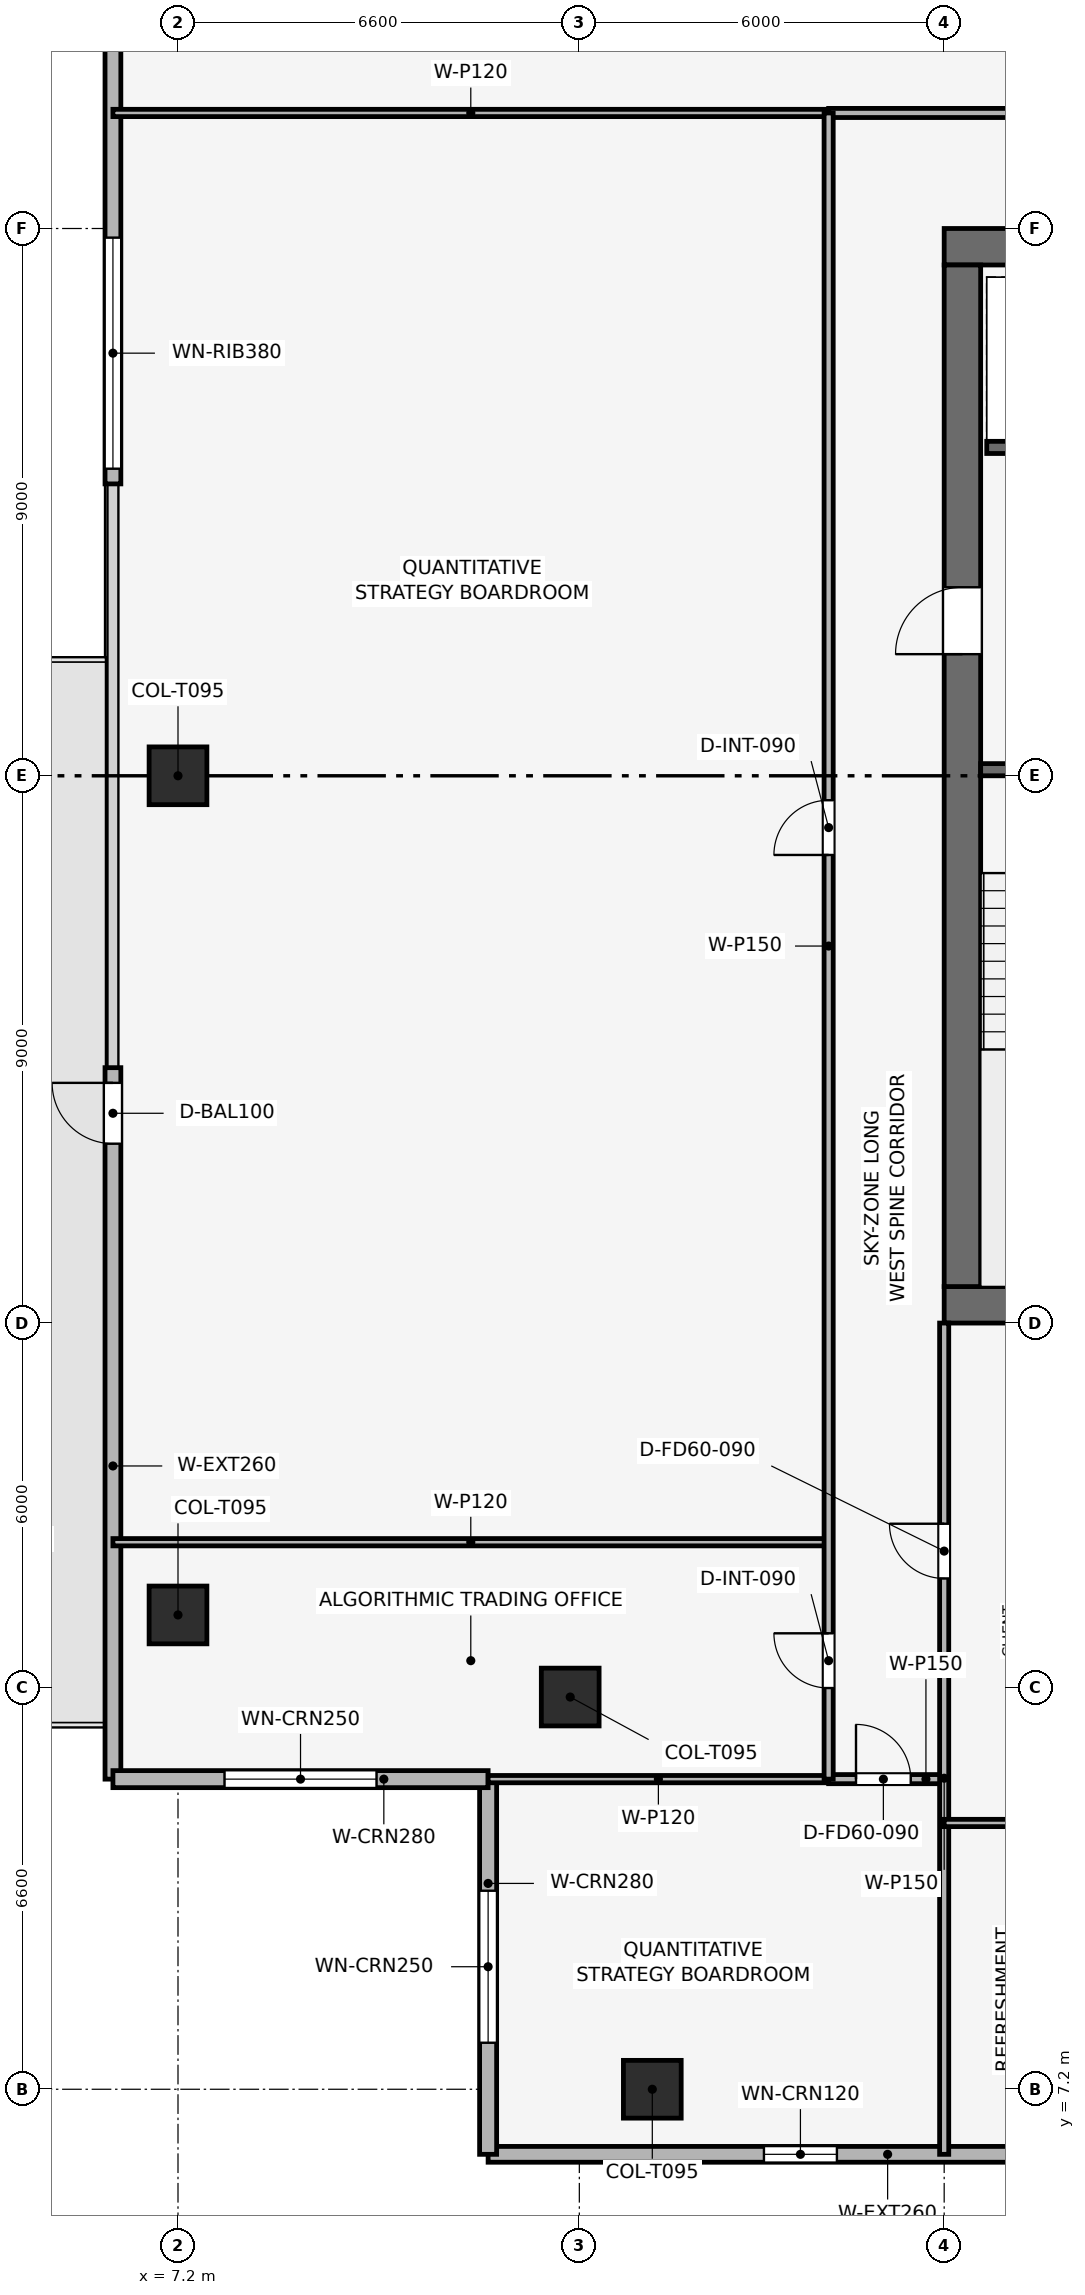
"""IFC4 building model, lengths in metres.
Left out: names, types, materials, properties, quantities, classifications, styles, units other than length and angle.
Written with IfcOpenShell. Run it as: python <this file> out.ifc"""

import sys

from ifc_helpers import new_model, si_unit, direction, frame, frame_2d, origin, origin_2d, place, context, subcontext, project, spatial, rectangle, extrude, element, fill, save


model = new_model("IFC4")
c1 = context("Model", 3, precision=1e-05, world=origin(), true_north=direction((0.0, 1.0)))
c2 = subcontext(c1, "Body", "Model", "MODEL_VIEW")
j1 = project(units=[si_unit("LENGTHUNIT", "METRE"), si_unit("PLANEANGLEUNIT", "RADIAN")], contexts=[c1])
p1 = place(None, origin())
s1 = spatial("IfcSite", under=j1, at=p1, CompositionType="ELEMENT")
p2 = place(p1, origin())
s2 = spatial("IfcBuilding", under=s1, at=p2, CompositionType="ELEMENT")
p3 = place(p2, frame((0.0, 0.0, 310.5)))
s3 = spatial("IfcBuildingStorey", under=s2, at=p3, CompositionType="ELEMENT", Elevation=310.5)
p4 = place(p3, frame((19.8, 20.1, 0.0), z_axis=(0.0, 0.0, 1.0), x_axis=(1.0, 0.0, 0.0)))
e1 = element("IfcWall", 1, at=p4, inside=s3, PredefinedType="SHEAR", context=c2, shape_type="SweptSolid", body=[
    extrude(rectangle(XDim=18.0, YDim=0.6, at=frame_2d((9.0, 0.0))), origin(), (0.0, 0.0, 1.0), 3.75),
])
p5 = place(p3, frame((19.8, 37.5, 0.0), z_axis=(0.0, 0.0, 1.0), x_axis=(1.0, 0.0, 0.0)))
e2 = element("IfcWall", 2, at=p5, inside=s3, PredefinedType="SHEAR", context=c2, shape_type="SweptSolid", body=[
    extrude(rectangle(XDim=18.0, YDim=0.6, at=frame_2d((9.0, 0.0))), origin(), (0.0, 0.0, 1.0), 3.75),
])
p6 = place(p5, frame((7.05, 0.0, 0.0)))
e3 = element("IfcOpeningElement", 3, at=p6, cuts=e2, PredefinedType="OPENING", context=c2, shape_type="SweptSolid", body=[
    extrude(rectangle(XDim=1.1, YDim=2.15, at=frame_2d((0.55, 1.075))), frame((0.0, 0.31, 0.0), z_axis=(0.0, -1.0, 0.0), x_axis=(1.0, 0.0, 0.0)), (0.0, 0.0, 1.0), 0.62),
])
p7 = place(p3, frame((20.1, 20.4, 0.0), z_axis=(0.0, 0.0, 1.0), x_axis=(0.0, 1.0, 0.0)))
e4 = element("IfcWall", 4, at=p7, inside=s3, PredefinedType="SHEAR", context=c2, shape_type="SweptSolid", body=[
    extrude(rectangle(XDim=16.8, YDim=0.6, at=frame_2d((8.4, 0.0))), origin(), (0.0, 0.0, 1.0), 3.75),
])
p8 = place(p7, frame((10.4, 0.0, 0.0)))
e5 = element("IfcOpeningElement", 5, at=p8, cuts=e4, PredefinedType="OPENING", context=c2, shape_type="SweptSolid", body=[
    extrude(rectangle(XDim=1.1, YDim=2.15, at=frame_2d((0.55, 1.075))), frame((0.0, 0.31, 0.0), z_axis=(0.0, -1.0, 0.0), x_axis=(1.0, 0.0, 0.0)), (0.0, 0.0, 1.0), 0.62),
])
for number, where, z_axis, x_axis in (
    (6, (15.0, 7.2, 0.003), (0.0, 0.0, 1.0), (1.0, 0.0, 0.0)),
    (7, (7.2, 28.8, 0.003), (0.0, 0.0, 1.0), (1.0, 0.0, 0.0)),
    (8, (7.2, 15.0, 0.003), (0.0, 0.0, 1.0), (1.0, 0.0, 0.0)),
    (9, (13.65, 13.65, 0.003), (0.0, 0.0, 1.0), (1.0, 0.0, 0.0)),
):
    element("IfcColumn", number, at=place(p3, frame(where, z_axis=z_axis, x_axis=x_axis)), inside=s3, PredefinedType="COLUMN", context=c2, shape_type="SweptSolid", body=[
        extrude(rectangle(XDim=0.95, YDim=0.95, at=origin_2d()), origin(), (0.0, 0.0, 1.0), 3.504),
    ])
p9 = place(p3, frame((24.0, 6.13, 0.0), z_axis=(0.0, 0.0, 1.0), x_axis=(-1.0, 0.0, 0.0)))
e10 = element("IfcWall", 10, at=p9, inside=s3, PredefinedType="SOLIDWALL", context=c2, shape_type="SweptSolid", body=[
    extrude(rectangle(XDim=11.7, YDim=0.26, at=frame_2d((5.85, 0.0))), origin(), (0.0, 0.0, 1.0), 3.51),
])
p10 = place(p9, frame((5.964, 0.0, 0.9)))
e11 = element("IfcOpeningElement", 11, at=p10, cuts=e10, PredefinedType="OPENING", context=c2, shape_type="SweptSolid", body=[
    extrude(rectangle(XDim=1.2, YDim=2.1, at=frame_2d((0.6, 1.05))), frame((0.0, 0.14, 0.0), z_axis=(0.0, -1.0, 0.0), x_axis=(1.0, 0.0, 0.0)), (0.0, 0.0, 1.0), 0.28),
])
p11 = place(p3, frame((6.13, 12.3, 0.0), z_axis=(0.0, 0.0, 1.0), x_axis=(0.0, 1.0, 0.0)))
e12 = element("IfcWall", 12, at=p11, inside=s3, PredefinedType="SOLIDWALL", context=c2, shape_type="SweptSolid", body=[
    extrude(rectangle(XDim=11.7, YDim=0.26, at=frame_2d((5.85, 0.0))), origin(), (0.0, 0.0, 1.0), 3.51),
])
p12 = place(p11, frame((10.45, 0.0, 0.0)))
e13 = element("IfcOpeningElement", 13, at=p12, cuts=e12, PredefinedType="OPENING", context=c2, shape_type="SweptSolid", body=[
    extrude(rectangle(XDim=1.0, YDim=2.2, at=frame_2d((0.5, 1.1))), frame((0.0, 0.14, 0.0), z_axis=(0.0, -1.0, 0.0), x_axis=(1.0, 0.0, 0.0)), (0.0, 0.0, 1.0), 0.28),
])
p13 = place(p3, frame((6.13, 33.6, 0.0), z_axis=(0.0, 0.0, 1.0), x_axis=(0.0, 1.0, 0.0)))
e14 = element("IfcWall", 14, at=p13, inside=s3, PredefinedType="SOLIDWALL", context=c2, shape_type="SweptSolid", body=[
    extrude(rectangle(XDim=11.7, YDim=0.26, at=frame_2d((5.85, 0.0))), origin(), (0.0, 0.0, 1.0), 3.51),
])
p14 = place(p13, frame((0.25, 0.0, 0.9)))
e15 = element("IfcOpeningElement", 15, at=p14, cuts=e14, PredefinedType="OPENING", context=c2, shape_type="SweptSolid", body=[
    extrude(rectangle(XDim=3.8, YDim=1.9, at=frame_2d((1.9, 0.95))), frame((0.0, 0.14, 0.0), z_axis=(0.0, -1.0, 0.0), x_axis=(1.0, 0.0, 0.0)), (0.0, 0.0, 1.0), 0.28),
])
p15 = place(p3, frame((12.3, 6.13, 0.0), z_axis=(0.0, 0.0, 1.0), x_axis=(0.0, 1.0, 0.0)))
e16 = element("IfcWall", 16, at=p15, inside=s3, PredefinedType="SOLIDWALL", context=c2, shape_type="SweptSolid", body=[
    extrude(rectangle(XDim=6.17, YDim=0.28, at=frame_2d((3.085, 0.0))), origin(), (0.0, 0.0, 1.0), 3.51),
])
p16 = place(p15, frame((1.835, 0.0, 0.9)))
e17 = element("IfcOpeningElement", 17, at=p16, cuts=e16, PredefinedType="OPENING", context=c2, shape_type="SweptSolid", body=[
    extrude(rectangle(XDim=2.5, YDim=1.9, at=frame_2d((1.25, 0.95))), frame((0.0, 0.15, 0.0), z_axis=(0.0, -1.0, 0.0), x_axis=(1.0, 0.0, 0.0)), (0.0, 0.0, 1.0), 0.3),
])
p17 = place(p3, frame((12.3, 12.3, 0.0), z_axis=(0.0, 0.0, 1.0), x_axis=(-1.0, 0.0, 0.0)))
e18 = element("IfcWall", 18, at=p17, inside=s3, PredefinedType="SOLIDWALL", context=c2, shape_type="SweptSolid", body=[
    extrude(rectangle(XDim=6.17, YDim=0.28, at=frame_2d((3.085, 0.0))), origin(), (0.0, 0.0, 1.0), 3.51),
])
p18 = place(p17, frame((1.835, 0.0, 0.9)))
e19 = element("IfcOpeningElement", 19, at=p18, cuts=e18, PredefinedType="OPENING", context=c2, shape_type="SweptSolid", body=[
    extrude(rectangle(XDim=2.5, YDim=1.9, at=frame_2d((1.25, 0.95))), frame((0.0, 0.15, 0.0), z_axis=(0.0, -1.0, 0.0), x_axis=(1.0, 0.0, 0.0)), (0.0, 0.0, 1.0), 0.3),
])
p19 = place(p3, frame((20.4, 28.9, 0.0), z_axis=(0.0, 0.0, 1.0), x_axis=(1.0, 0.0, 0.0)))
e20 = element("IfcWall", 20, at=p19, inside=s3, PredefinedType="SHEAR", context=c2, shape_type="SweptSolid", body=[
    extrude(rectangle(XDim=3.15, YDim=0.2, at=frame_2d((1.575, 0.0))), origin(), (0.0, 0.0, 1.0), 3.51),
])
p20 = place(p19, frame((0.8, 0.0, 0.0)))
e21 = element("IfcOpeningElement", 21, at=p20, cuts=e20, PredefinedType="OPENING", context=c2, shape_type="SweptSolid", body=[
    extrude(rectangle(XDim=1.0, YDim=2.1, at=frame_2d((0.5, 1.05))), frame((0.0, 0.11, 0.0), z_axis=(0.0, -1.0, 0.0), x_axis=(1.0, 0.0, 0.0)), (0.0, 0.0, 1.0), 0.22),
])
p21 = place(p3, frame((20.5, 34.2, 0.0), z_axis=(0.0, 0.0, 1.0), x_axis=(1.0, 0.0, 0.0)))
e22 = element("IfcWall", 22, at=p21, inside=s3, PredefinedType="SHEAR", context=c2, shape_type="SweptSolid", body=[
    extrude(rectangle(XDim=3.05, YDim=0.2, at=frame_2d((1.525, 0.0))), origin(), (0.0, 0.0, 1.0), 3.51),
])
p22 = place(p21, frame((0.75, 0.0, 0.0)))
e23 = element("IfcOpeningElement", 23, at=p22, cuts=e22, PredefinedType="OPENING", context=c2, shape_type="SweptSolid", body=[
    extrude(rectangle(XDim=1.1, YDim=2.15, at=frame_2d((0.55, 1.075))), frame((0.0, 0.11, 0.0), z_axis=(0.0, -1.0, 0.0), x_axis=(1.0, 0.0, 0.0)), (0.0, 0.0, 1.0), 0.22),
])
p23 = place(p3, frame((6.13, 16.196, 0.0), z_axis=(0.0, 0.0, 1.0), x_axis=(1.0, 0.0, 0.0)))
e24 = element("IfcWall", 24, at=p23, inside=s3, PredefinedType="PARTITIONING", context=c2, shape_type="SweptSolid", body=[
    extrude(rectangle(XDim=11.77, YDim=0.12, at=frame_2d((5.885, 0.0))), origin(), (0.0, 0.0, 1.0), 3.095),
])
p24 = place(p3, frame((12.3, 12.3, 0.0), z_axis=(0.0, 0.0, 1.0), x_axis=(1.0, 0.0, 0.0)))
e25 = element("IfcWall", 25, at=p24, inside=s3, PredefinedType="PARTITIONING", context=c2, shape_type="SweptSolid", body=[
    extrude(rectangle(XDim=5.6, YDim=0.12, at=frame_2d((2.8, 0.0))), origin(), (0.0, 0.0, 1.0), 3.195),
])
p25 = place(p3, frame((17.9, 12.3, 0.0), z_axis=(0.0, 0.0, 1.0), x_axis=(1.0, 0.0, 0.0)))
e26 = element("IfcWall", 26, at=p25, inside=s3, PredefinedType="PARTITIONING", context=c2, shape_type="SweptSolid", body=[
    extrude(rectangle(XDim=1.9, YDim=0.15, at=frame_2d((0.95, 0.0))), origin(), (0.0, 0.0, 1.0), 3.51),
])
p26 = place(p25, frame((0.45, 0.0, 0.0)))
e27 = element("IfcOpeningElement", 27, at=p26, cuts=e26, PredefinedType="OPENING", context=c2, shape_type="SweptSolid", body=[
    extrude(rectangle(XDim=0.9, YDim=2.1, at=frame_2d((0.45, 1.05))), frame((0.0, 0.085, 0.0), z_axis=(0.0, -1.0, 0.0), x_axis=(1.0, 0.0, 0.0)), (0.0, 0.0, 1.0), 0.17),
])
p27 = place(p3, frame((19.8, 6.13, 0.0), z_axis=(0.0, 0.0, 1.0), x_axis=(0.0, 1.0, 0.0)))
e28 = element("IfcWall", 28, at=p27, inside=s3, PredefinedType="PARTITIONING", context=c2, shape_type="SweptSolid", body=[
    extrude(rectangle(XDim=13.67, YDim=0.15, at=frame_2d((6.835, 0.0))), origin(), (0.0, 0.0, 1.0), 3.095),
])
p28 = place(p27, frame((9.47, 0.0, 0.0)))
e29 = element("IfcOpeningElement", 29, at=p28, cuts=e28, PredefinedType="OPENING", context=c2, shape_type="SweptSolid", body=[
    extrude(rectangle(XDim=0.9, YDim=2.1, at=frame_2d((0.45, 1.05))), frame((0.0, 0.085, 0.0), z_axis=(0.0, -1.0, 0.0), x_axis=(1.0, 0.0, 0.0)), (0.0, 0.0, 1.0), 0.17),
])
p29 = place(p3, frame((19.8, 11.579, 0.0), z_axis=(0.0, 0.0, 1.0), x_axis=(1.0, 0.0, 0.0)))
e30 = element("IfcWall", 30, at=p29, inside=s3, PredefinedType="PARTITIONING", context=c2, shape_type="SweptSolid", body=[
    extrude(rectangle(XDim=2.417, YDim=0.12, at=frame_2d((1.208, 0.0))), origin(), (0.0, 0.0, 1.0), 3.095),
])
p30 = place(p29, frame((1.317, 0.0, 0.0)))
e31 = element("IfcOpeningElement", 31, at=p30, cuts=e30, PredefinedType="OPENING", context=c2, shape_type="SweptSolid", body=[
    extrude(rectangle(XDim=0.9, YDim=2.1, at=frame_2d((0.45, 1.05))), frame((0.0, 0.07, 0.0), z_axis=(0.0, -1.0, 0.0), x_axis=(1.0, 0.0, 0.0)), (0.0, 0.0, 1.0), 0.14),
])
p31 = place(p3, frame((6.13, 39.7, 0.0), z_axis=(0.0, 0.0, 1.0), x_axis=(1.0, 0.0, 0.0)))
e32 = element("IfcWall", 32, at=p31, inside=s3, PredefinedType="PARTITIONING", context=c2, shape_type="SweptSolid", body=[
    extrude(rectangle(XDim=11.77, YDim=0.12, at=frame_2d((5.885, 0.0))), origin(), (0.0, 0.0, 1.0), 3.095),
])
p32 = place(p3, frame((17.9, 39.7, 0.0), z_axis=(0.0, 0.0, 1.0), x_axis=(1.0, 0.0, 0.0)))
e33 = element("IfcWall", 33, at=p32, inside=s3, PredefinedType="PARTITIONING", context=c2, shape_type="SweptSolid", body=[
    extrude(rectangle(XDim=21.8, YDim=0.15, at=frame_2d((10.9, 0.0))), origin(), (0.0, 0.0, 1.0), 3.095),
])
p33 = place(p32, frame((10.45, 0.0, 0.0)))
e34 = element("IfcOpeningElement", 34, at=p33, cuts=e33, PredefinedType="OPENING", context=c2, shape_type="SweptSolid", body=[
    extrude(rectangle(XDim=0.9, YDim=2.1, at=frame_2d((0.45, 1.05))), frame((0.0, 0.085, 0.0), z_axis=(0.0, -1.0, 0.0), x_axis=(1.0, 0.0, 0.0)), (0.0, 0.0, 1.0), 0.17),
])
p34 = place(p3, frame((17.9, 12.3, 0.0), z_axis=(0.0, 0.0, 1.0), x_axis=(0.0, 1.0, 0.0)))
e35 = element("IfcWall", 35, at=p34, inside=s3, PredefinedType="PARTITIONING", context=c2, shape_type="SweptSolid", body=[
    extrude(rectangle(XDim=27.4, YDim=0.15, at=frame_2d((13.7, 0.0))), origin(), (0.0, 0.0, 1.0), 3.095),
])
p35 = place(p34, frame((1.498, 0.0, 0.0)))
e36 = element("IfcOpeningElement", 36, at=p35, cuts=e35, PredefinedType="OPENING", context=c2, shape_type="SweptSolid", body=[
    extrude(rectangle(XDim=0.9, YDim=2.1, at=frame_2d((0.45, 1.05))), frame((0.0, 0.085, 0.0), z_axis=(0.0, -1.0, 0.0), x_axis=(1.0, 0.0, 0.0)), (0.0, 0.0, 1.0), 0.17),
])
p36 = place(p34, frame((15.198, 0.0, 0.0)))
e37 = element("IfcOpeningElement", 37, at=p36, cuts=e35, PredefinedType="OPENING", context=c2, shape_type="SweptSolid", body=[
    extrude(rectangle(XDim=0.9, YDim=2.1, at=frame_2d((0.45, 1.05))), frame((0.0, 0.085, 0.0), z_axis=(0.0, -1.0, 0.0), x_axis=(1.0, 0.0, 0.0)), (0.0, 0.0, 1.0), 0.17),
])
p37 = place(p10, origin())
e38 = element("IfcWindow", 38, at=p37, inside=s3, PartitioningType="SINGLE_PANEL", PredefinedType="WINDOW", context=c2, shape_type="SweptSolid", body=[
    extrude(rectangle(XDim=1.2, YDim=2.1, at=frame_2d((0.6, 1.05))), frame((0.0, 0.03, 0.0), z_axis=(0.0, -1.0, 0.0), x_axis=(1.0, 0.0, 0.0)), (0.0, 0.0, 1.0), 0.06),
])
fill(e11, e38)
p38 = place(p12, origin())
e39 = element("IfcDoor", 39, at=p38, inside=s3, OperationType="SINGLE_SWING_RIGHT", PredefinedType="DOOR", context=c2, shape_type="SweptSolid", body=[
    extrude(rectangle(XDim=1.0, YDim=2.2, at=frame_2d((0.5, 1.1))), frame((0.0, 0.025, 0.0), z_axis=(0.0, -1.0, 0.0), x_axis=(1.0, 0.0, 0.0)), (0.0, 0.0, 1.0), 0.05),
])
fill(e13, e39)
p39 = place(p14, origin())
e40 = element("IfcWindow", 40, at=p39, inside=s3, PartitioningType="SINGLE_PANEL", PredefinedType="WINDOW", context=c2, shape_type="SweptSolid", body=[
    extrude(rectangle(XDim=3.8, YDim=1.9, at=frame_2d((1.9, 0.95))), frame((0.0, 0.03, 0.0), z_axis=(0.0, -1.0, 0.0), x_axis=(1.0, 0.0, 0.0)), (0.0, 0.0, 1.0), 0.06),
])
fill(e15, e40)
p40 = place(p16, origin())
e41 = element("IfcWindow", 41, at=p40, inside=s3, PartitioningType="SINGLE_PANEL", PredefinedType="WINDOW", context=c2, shape_type="SweptSolid", body=[
    extrude(rectangle(XDim=2.5, YDim=1.9, at=frame_2d((1.25, 0.95))), frame((0.0, 0.03, 0.0), z_axis=(0.0, -1.0, 0.0), x_axis=(1.0, 0.0, 0.0)), (0.0, 0.0, 1.0), 0.06),
])
fill(e17, e41)
p41 = place(p18, origin())
e42 = element("IfcWindow", 42, at=p41, inside=s3, PartitioningType="SINGLE_PANEL", PredefinedType="WINDOW", context=c2, shape_type="SweptSolid", body=[
    extrude(rectangle(XDim=2.5, YDim=1.9, at=frame_2d((1.25, 0.95))), frame((0.0, 0.03, 0.0), z_axis=(0.0, -1.0, 0.0), x_axis=(1.0, 0.0, 0.0)), (0.0, 0.0, 1.0), 0.06),
])
fill(e19, e42)
p42 = place(p26, origin())
e43 = element("IfcDoor", 43, at=p42, inside=s3, OperationType="SINGLE_SWING_LEFT", PredefinedType="DOOR", context=c2, shape_type="SweptSolid", body=[
    extrude(rectangle(XDim=0.9, YDim=2.1, at=frame_2d((0.45, 1.05))), frame((0.0, 0.025, 0.0), z_axis=(0.0, -1.0, 0.0), x_axis=(1.0, 0.0, 0.0)), (0.0, 0.0, 1.0), 0.05),
])
fill(e27, e43)
p43 = place(p28, origin())
e44 = element("IfcDoor", 44, at=p43, inside=s3, OperationType="SINGLE_SWING_RIGHT", PredefinedType="DOOR", context=c2, shape_type="SweptSolid", body=[
    extrude(rectangle(XDim=0.9, YDim=2.1, at=frame_2d((0.45, 1.05))), frame((0.0, 0.025, 0.0), z_axis=(0.0, -1.0, 0.0), x_axis=(1.0, 0.0, 0.0)), (0.0, 0.0, 1.0), 0.05),
])
fill(e29, e44)
p44 = place(p35, origin())
e45 = element("IfcDoor", 45, at=p44, inside=s3, OperationType="SINGLE_SWING_RIGHT", PredefinedType="DOOR", context=c2, shape_type="SweptSolid", body=[
    extrude(rectangle(XDim=0.9, YDim=2.1, at=frame_2d((0.45, 1.05))), frame((0.0, 0.025, 0.0), z_axis=(0.0, -1.0, 0.0), x_axis=(1.0, 0.0, 0.0)), (0.0, 0.0, 1.0), 0.05),
])
fill(e36, e45)
p45 = place(p36, origin())
e46 = element("IfcDoor", 46, at=p45, inside=s3, OperationType="SINGLE_SWING_LEFT", PredefinedType="DOOR", context=c2, shape_type="SweptSolid", body=[
    extrude(rectangle(XDim=0.9, YDim=2.1, at=frame_2d((0.45, 1.05))), frame((0.0, 0.025, 0.0), z_axis=(0.0, -1.0, 0.0), x_axis=(1.0, 0.0, 0.0)), (0.0, 0.0, 1.0), 0.05),
])
fill(e37, e46)
p46 = place(p8, origin())
e47 = element("IfcDoor", 47, at=p46, inside=s3, OperationType="SINGLE_SWING_LEFT", PredefinedType="DOOR", context=c2, shape_type="SweptSolid", body=[
    extrude(rectangle(XDim=1.1, YDim=2.15, at=frame_2d((0.55, 1.075))), frame((0.0, 0.025, 0.0), z_axis=(0.0, -1.0, 0.0), x_axis=(1.0, 0.0, 0.0)), (0.0, 0.0, 1.0), 0.05),
])
fill(e5, e47)
save(model, sys.argv[1])
